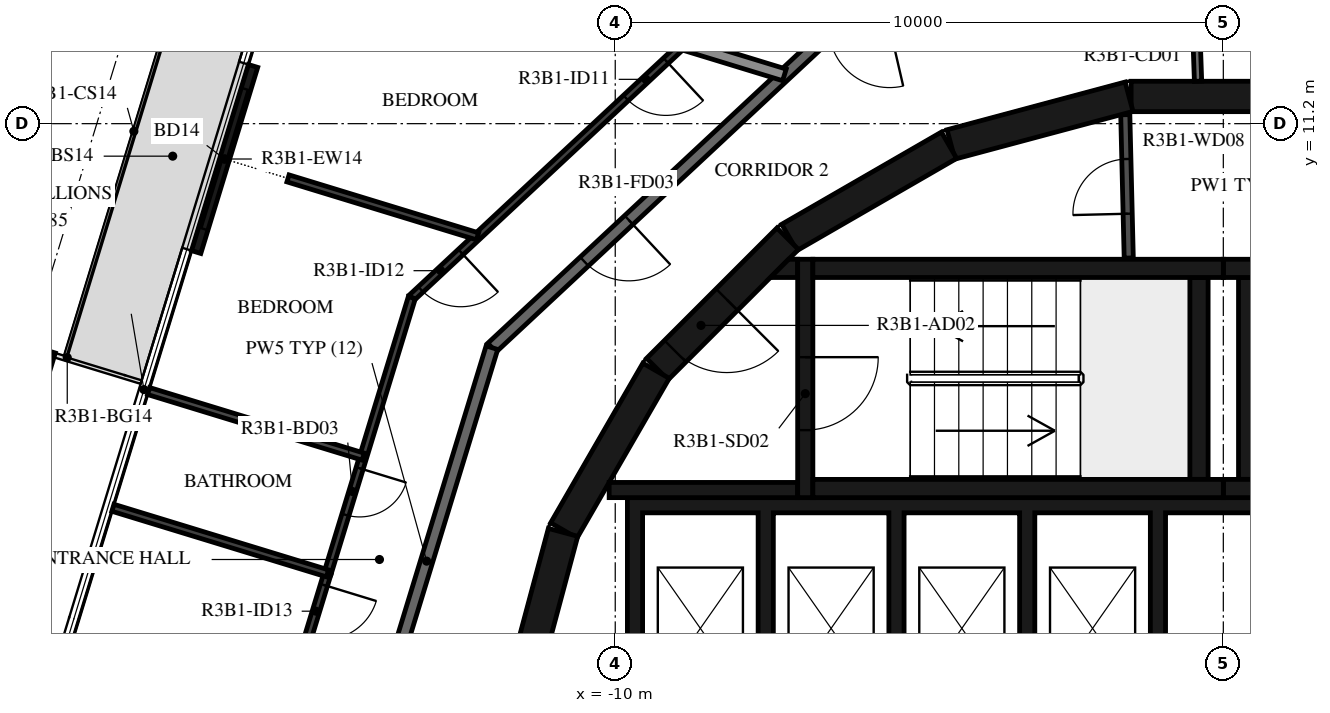
"""IFC4 building model, lengths in metres.
Left out: names, types, materials, properties, quantities, classifications, styles, units other than length and angle.
Written with IfcOpenShell. Run it as: python <this file> out.ifc"""

import sys

from ifc_helpers import new_model, si_unit, direction, frame, frame_2d, origin, origin_2d, place, context, subcontext, project, spatial, polyline, rectangle, i_section, outline, extrude, element, fill, save


model = new_model("IFC4")
c1 = context("Model", 3, precision=1e-05, world=origin(), true_north=direction((0.0, 1.0)))
c2 = subcontext(c1, "Body", "Model", "MODEL_VIEW")
j1 = project(units=[si_unit("LENGTHUNIT", "METRE"), si_unit("PLANEANGLEUNIT", "RADIAN")], contexts=[c1])
p1 = place(None, origin())
s1 = spatial("IfcSite", under=j1, at=p1, CompositionType="ELEMENT")
p2 = place(p1, origin())
s2 = spatial("IfcBuilding", under=s1, at=p2, CompositionType="ELEMENT")
p3 = place(p2, frame((0.0, 0.0, 123.9)))
s3 = spatial("IfcBuildingStorey", under=s2, at=p3, CompositionType="ELEMENT", Elevation=123.9)
p4 = place(p3, frame((-19.682, 7.417, -0.38), z_axis=(0.0, 0.0, 1.0), x_axis=(0.29237190653, 0.956304694264, 0.0)))
e1 = element("IfcColumn", 1, at=p4, inside=s3, PredefinedType="COLUMN", context=c2, shape_type="SweptSolid", body=[
    extrude(i_section(OverallWidth=0.3, OverallDepth=0.9, WebThickness=0.019, FlangeThickness=0.035, FilletRadius=0.03, at=origin_2d()), origin(), (0.0, 0.0, 1.0), 3.5),
])
p5 = place(p3, frame((-15.956, 12.149, 0.0), z_axis=(0.0, 0.0, 1.0), x_axis=(-0.29243949851, -0.956284026695, 0.0)))
e2 = element("IfcWall", 2, at=p5, inside=s3, PredefinedType="STANDARD", context=c2, shape_type="SweptSolid", body=[
    extrude(rectangle(XDim=3.2, YDim=0.16, at=frame_2d((1.6, 0.0))), origin(), (0.0, 0.0, 1.0), 3.12),
])
p6 = place(p5, frame((0.4, 0.0, 0.0)))
e3 = element("IfcOpeningElement", 3, at=p6, cuts=e2, PredefinedType="OPENING", context=c2, shape_type="SweptSolid", body=[
    extrude(rectangle(XDim=2.4, YDim=2.4, at=frame_2d((1.2, 1.2))), frame((0.0, 0.09, 0.0), z_axis=(0.0, -1.0, 0.0), x_axis=(1.0, 0.0, 0.0)), (0.0, 0.0, 1.0), 0.18),
])
for number, where, z_axis, x_axis in (
    (4, (1.516, 11.647, 0.0), (0.0, 0.0, 1.0), (-1.0, 0.0, 0.0)),
    (5, (-1.55, 11.643, 0.0), (0.0, 0.0, 1.0), (-0.966, -0.259, 0.0)),
    (6, (-4.51, 10.845, 0.0), (0.0, 0.0, 1.0), (-0.866, -0.5, 0.0)),
):
    element("IfcWall", number, at=place(p3, frame(where, z_axis=z_axis, x_axis=x_axis)), inside=s3, PredefinedType="SHEAR", context=c2, shape_type="SweptSolid", body=[
        extrude(rectangle(XDim=3.033, YDim=0.5, at=frame_2d((1.516, 0.0))), origin(), (0.0, 0.0, 1.0), 3.12),
    ])
p7 = place(p3, frame((-7.164, 9.308, 0.0), z_axis=(0.0, 0.0, 1.0), x_axis=(-0.707106781187, -0.707106781187, 0.0)))
e7 = element("IfcWall", 7, at=p7, inside=s3, PredefinedType="SHEAR", context=c2, shape_type="SweptSolid", body=[
    extrude(rectangle(XDim=3.032, YDim=0.5, at=frame_2d((1.516, 0.0))), origin(), (0.0, 0.0, 1.0), 3.12),
])
p8 = place(p7, frame((1.416, 0.0, 0.0)))
e8 = element("IfcOpeningElement", 8, at=p8, cuts=e7, PredefinedType="OPENING", context=c2, shape_type="SweptSolid", body=[
    extrude(rectangle(XDim=1.2, YDim=2.1, at=frame_2d((0.6, 1.05))), frame((0.0, 0.26, 0.0), z_axis=(0.0, -1.0, 0.0), x_axis=(1.0, 0.0, 0.0)), (0.0, 0.0, 1.0), 0.52),
])
for number, where, z_axis, x_axis in (
    (9, (-9.329, 7.137, 0.0), (0.0, 0.0, 1.0), (-0.5, -0.866, 0.0)),
    (10, (-10.858, 4.479, 0.0), (0.0, 0.0, 1.0), (-0.259, -0.966, 0.0)),
):
    element("IfcWall", number, at=place(p3, frame(where, z_axis=z_axis, x_axis=x_axis)), inside=s3, PredefinedType="SHEAR", context=c2, shape_type="SweptSolid", body=[
        extrude(rectangle(XDim=3.033, YDim=0.5, at=frame_2d((1.516, 0.0))), origin(), (0.0, 0.0, 1.0), 3.12),
    ])
for number, where, z_axis, x_axis in (
    (11, (0.0, 5.2, 0.0), (0.0, 0.0, 1.0), (1.0, 0.0, 0.0)),
    (12, (0.0, 8.82, 0.0), (0.0, 0.0, 1.0), (1.0, 0.0, 0.0)),
):
    element("IfcWall", number, at=place(p3, frame(where, z_axis=z_axis, x_axis=x_axis)), inside=s3, PredefinedType="SHEAR", context=c2, shape_type="SweptSolid", body=[
        extrude(rectangle(XDim=6.75, YDim=0.3, at=frame_2d((3.375, 0.0))), origin(), (0.0, 0.0, 1.0), 3.12),
    ])
p9 = place(p3, frame((0.4, 5.35, 0.0), z_axis=(0.0, 0.0, 1.0), x_axis=(0.0, 1.0, 0.0)))
e13 = element("IfcWall", 13, at=p9, inside=s3, PredefinedType="SHEAR", context=c2, shape_type="SweptSolid", body=[
    extrude(rectangle(XDim=3.32, YDim=0.3, at=frame_2d((1.66, 0.0))), origin(), (0.0, 0.0, 1.0), 3.12),
])
for number, where, z_axis, x_axis in (
    (14, (-6.75, 5.2, 0.0), (0.0, 0.0, 1.0), (1.0, 0.0, 0.0)),
    (15, (-6.75, 8.82, 0.0), (0.0, 0.0, 1.0), (1.0, 0.0, 0.0)),
):
    element("IfcWall", number, at=place(p3, frame(where, z_axis=z_axis, x_axis=x_axis)), inside=s3, PredefinedType="SHEAR", context=c2, shape_type="SweptSolid", body=[
        extrude(rectangle(XDim=6.75, YDim=0.3, at=frame_2d((3.375, 0.0))), origin(), (0.0, 0.0, 1.0), 3.12),
    ])
p10 = place(p3, frame((-0.4, 5.35, 0.0), z_axis=(0.0, 0.0, 1.0), x_axis=(0.0, 1.0, 0.0)))
e16 = element("IfcWall", 16, at=p10, inside=s3, PredefinedType="SHEAR", context=c2, shape_type="SweptSolid", body=[
    extrude(rectangle(XDim=3.32, YDim=0.3, at=frame_2d((1.66, 0.0))), origin(), (0.0, 0.0, 1.0), 3.12),
])
p11 = place(p3, frame((-6.875, 8.97, 0.0), z_axis=(0.0, 0.0, 1.0), x_axis=(0.0, -1.0, 0.0)))
e17 = element("IfcWall", 17, at=p11, inside=s3, PredefinedType="SHEAR", context=c2, shape_type="SweptSolid", body=[
    extrude(rectangle(XDim=3.92, YDim=0.25, at=frame_2d((1.96, 0.0))), origin(), (0.0, 0.0, 1.0), 3.12),
])
p12 = place(p11, frame((1.61, 0.0, 0.0)))
e18 = element("IfcOpeningElement", 18, at=p12, cuts=e17, PredefinedType="OPENING", context=c2, shape_type="SweptSolid", body=[
    extrude(rectangle(XDim=1.2, YDim=2.1, at=frame_2d((0.6, 1.05))), frame((0.0, 0.135, 0.0), z_axis=(0.0, -1.0, 0.0), x_axis=(1.0, 0.0, 0.0)), (0.0, 0.0, 1.0), 0.27),
])
p13 = place(p3, frame((-7.0, 5.175, 0.0), z_axis=(0.0, 0.0, 1.0), x_axis=(-1.0, 0.0, 0.0)))
e19 = element("IfcWall", 19, at=p13, inside=s3, PredefinedType="SHEAR", context=c2, shape_type="SweptSolid", body=[
    extrude(rectangle(XDim=3.1, YDim=0.25, at=frame_2d((1.55, 0.0))), origin(), (0.0, 0.0, 1.0), 3.12),
])
p14 = place(p3, origin())
e20 = element("IfcWall", 20, at=p14, inside=s3, PredefinedType="SHEAR", context=c2, shape_type="SweptSolid", body=[
    extrude(outline(polyline([(-7.148, 8.97), (-7.0, 8.97), (-7.0, 8.67), (-7.448, 8.67), (-7.148, 8.97)])), origin(), (0.0, 0.0, 1.0), 3.12),
])
p15 = place(p3, origin())
e21 = element("IfcWall", 21, at=p15, inside=s3, PredefinedType="SHEAR", context=c2, shape_type="SweptSolid", body=[
    extrude(outline(polyline([(-9.55, 4.8), (-7.65, 4.8), (-7.65, 1.9), (-7.4, 1.9), (-7.4, 4.8), (-5.5, 4.8), (-5.5, 1.9), (-5.25, 1.9), (-5.25, 4.8), (-3.35, 4.8), (-3.35, 1.9), (-3.1, 1.9), (-3.1, 4.8), (-1.2, 4.8), (-1.2, 1.9), (-0.95, 1.9), (-0.95, 4.8), (3.1, 4.8), (3.1, 1.9), (3.35, 1.9), (3.35, 4.8), (5.25, 4.8), (5.25, 1.9), (5.5, 1.9), (5.5, 4.8), (7.4, 4.8), (7.4, 1.9), (7.65, 1.9), (7.65, 4.8), (9.55, 4.8), (9.55, 1.9), (9.8, 1.9), (9.8, 4.8), (9.8, 5.05), (-9.8, 5.05), (-9.8, 4.8), (-9.8, 1.9), (-9.55, 1.9), (-9.55, 4.8)])), origin(), (0.0, 0.0, 1.0), 3.12),
])
p16 = place(p3, frame((-1.555, 8.99, 0.0), z_axis=(0.0, 0.0, 1.0), x_axis=(-0.024125549686, 0.999708936567, 0.0)))
e22 = element("IfcWall", 22, at=p16, inside=s3, PredefinedType="PARTITIONING", context=c2, shape_type="SweptSolid", body=[
    extrude(rectangle(XDim=2.358, YDim=0.15, at=frame_2d((1.179, 0.0))), origin(), (0.0, 0.0, 1.0), 3.12),
])
p17 = place(p16, frame((0.729, 0.0, 0.0)))
e23 = element("IfcOpeningElement", 23, at=p17, cuts=e22, PredefinedType="OPENING", context=c2, shape_type="SweptSolid", body=[
    extrude(rectangle(XDim=0.9, YDim=2.1, at=frame_2d((0.45, 1.05))), frame((0.0, 0.085, 0.0), z_axis=(0.0, -1.0, 0.0), x_axis=(1.0, 0.0, 0.0)), (0.0, 0.0, 1.0), 0.17),
])
p18 = place(p3, frame((-0.487, 13.948, 0.0), z_axis=(0.0, 0.0, 1.0), x_axis=(0.034859752231, -0.999392214135, 0.0)))
e24 = element("IfcWall", 24, at=p18, inside=s3, PredefinedType="PARTITIONING", context=c2, shape_type="SweptSolid", body=[
    extrude(rectangle(XDim=2.052, YDim=0.12, at=frame_2d((1.026, 0.0))), origin(), (0.0, 0.0, 1.0), 3.12),
])
p19 = place(p18, frame((0.125, 0.0, 0.0)))
e25 = element("IfcOpeningElement", 25, at=p19, cuts=e24, PredefinedType="OPENING", context=c2, shape_type="SweptSolid", body=[
    extrude(rectangle(XDim=1.2, YDim=2.1, at=frame_2d((0.6, 1.05))), frame((0.0, 0.07, 0.0), z_axis=(0.0, -1.0, 0.0), x_axis=(1.0, 0.0, 0.0)), (0.0, 0.0, 1.0), 0.14),
])
p20 = place(p3, frame((-6.659, 12.523, 0.0), z_axis=(0.0, 0.0, 1.0), x_axis=(-0.731350455479, -0.682001841105, 0.0)))
e26 = element("IfcWall", 26, at=p20, inside=s3, PredefinedType="STANDARD", context=c2, shape_type="SweptSolid", body=[
    extrude(rectangle(XDim=7.342, YDim=0.2, at=frame_2d((3.671, 0.0))), origin(), (0.0, 0.0, 1.0), 3.12),
])
p21 = place(p20, frame((4.264, 0.0, 0.0)))
e27 = element("IfcOpeningElement", 27, at=p21, cuts=e26, PredefinedType="OPENING", context=c2, shape_type="SweptSolid", body=[
    extrude(rectangle(XDim=1.0, YDim=2.1, at=frame_2d((0.5, 1.05))), frame((0.0, 0.11, 0.0), z_axis=(0.0, -1.0, 0.0), x_axis=(1.0, 0.0, 0.0)), (0.0, 0.0, 1.0), 0.22),
])
p22 = place(p3, frame((-12.028, 7.516, 0.0), z_axis=(0.0, 0.0, 1.0), x_axis=(-0.292365533182, -0.956306642771, 0.0)))
e28 = element("IfcWall", 28, at=p22, inside=s3, PredefinedType="STANDARD", context=c2, shape_type="SweptSolid", body=[
    extrude(rectangle(XDim=7.342, YDim=0.2, at=frame_2d((3.671, 0.0))), origin(), (0.0, 0.0, 1.0), 3.12),
])
p23 = place(p3, frame((-15.327, 14.481, 0.0), z_axis=(0.0, 0.0, 1.0), x_axis=(0.956303504869, -0.292375796837, 0.0)))
e29 = element("IfcWall", 29, at=p23, inside=s3, PredefinedType="STANDARD", context=c2, shape_type="SweptSolid", body=[
    extrude(rectangle(XDim=8.48, YDim=0.2, at=frame_2d((4.24, 0.0))), origin(), (0.0, 0.0, 1.0), 2.73),
])
p24 = place(p3, frame((-7.388, 13.894, 0.0), z_axis=(0.0, 0.0, 1.0), x_axis=(-0.731357186721, -0.681994622729, 0.0)))
e30 = element("IfcWall", 30, at=p24, inside=s3, PredefinedType="PARTITIONING", context=c2, shape_type="SweptSolid", body=[
    extrude(rectangle(XDim=8.146, YDim=0.12, at=frame_2d((4.073, 0.0))), origin(), (0.0, 0.0, 1.0), 3.12),
])
p25 = place(p24, frame((2.432, 0.0, 0.0)))
e31 = element("IfcOpeningElement", 31, at=p25, cuts=e30, PredefinedType="OPENING", context=c2, shape_type="SweptSolid", body=[
    extrude(rectangle(XDim=0.9, YDim=2.1, at=frame_2d((0.45, 1.05))), frame((0.0, 0.07, 0.0), z_axis=(0.0, -1.0, 0.0), x_axis=(1.0, 0.0, 0.0)), (0.0, 0.0, 1.0), 0.14),
])
p26 = place(p24, frame((7.046, 0.0, 0.0)))
e32 = element("IfcOpeningElement", 32, at=p26, cuts=e30, PredefinedType="OPENING", context=c2, shape_type="SweptSolid", body=[
    extrude(rectangle(XDim=0.9, YDim=2.1, at=frame_2d((0.45, 1.05))), frame((0.0, 0.07, 0.0), z_axis=(0.0, -1.0, 0.0), x_axis=(1.0, 0.0, 0.0)), (0.0, 0.0, 1.0), 0.14),
])
p27 = place(p3, frame((-13.345, 8.339, 0.0), z_axis=(0.0, 0.0, 1.0), x_axis=(-0.292341490839, -0.956313992752, 0.0)))
e33 = element("IfcWall", 33, at=p27, inside=s3, PredefinedType="PARTITIONING", context=c2, shape_type="SweptSolid", body=[
    extrude(rectangle(XDim=4.742, YDim=0.12, at=frame_2d((2.371, 0.0))), origin(), (0.0, 0.0, 1.0), 3.12),
])
p28 = place(p27, frame((2.935, 0.0, 0.0)))
e34 = element("IfcOpeningElement", 34, at=p28, cuts=e33, PredefinedType="OPENING", context=c2, shape_type="SweptSolid", body=[
    extrude(rectangle(XDim=0.8, YDim=2.1, at=frame_2d((0.4, 1.05))), frame((0.0, 0.07, 0.0), z_axis=(0.0, -1.0, 0.0), x_axis=(1.0, 0.0, 0.0)), (0.0, 0.0, 1.0), 0.14),
])
p29 = place(p3, frame((-14.731, 3.804, 0.0), z_axis=(0.0, 0.0, 1.0), x_axis=(-0.292371609919, -0.956304784947, 0.0)))
e35 = element("IfcWall", 35, at=p29, inside=s3, PredefinedType="PARTITIONING", context=c2, shape_type="SweptSolid", body=[
    extrude(rectangle(XDim=3.404, YDim=0.12, at=frame_2d((1.702, 0.0))), origin(), (0.0, 0.0, 1.0), 3.12),
])
p30 = place(p29, frame((0.2, 0.0, 0.0)))
e36 = element("IfcOpeningElement", 36, at=p30, cuts=e35, PredefinedType="OPENING", context=c2, shape_type="SweptSolid", body=[
    extrude(rectangle(XDim=0.9, YDim=2.1, at=frame_2d((0.45, 1.05))), frame((0.0, 0.07, 0.0), z_axis=(0.0, -1.0, 0.0), x_axis=(1.0, 0.0, 0.0)), (0.0, 0.0, 1.0), 0.14),
])
p31 = place(p3, frame((-15.382, 10.3, 0.0), z_axis=(0.0, 0.0, 1.0), x_axis=(0.956302139964, -0.292380261134, 0.0)))
e37 = element("IfcWall", 37, at=p31, inside=s3, PredefinedType="PARTITIONING", context=c2, shape_type="SweptSolid", body=[
    extrude(rectangle(XDim=3.26, YDim=0.12, at=frame_2d((1.63, 0.0))), origin(), (0.0, 0.0, 1.0), 3.12),
])
p32 = place(p3, frame((-17.674, 6.803, 0.0), z_axis=(0.0, 0.0, 1.0), x_axis=(0.956309456779, -0.292356328604, 0.0)))
e38 = element("IfcWall", 38, at=p32, inside=s3, PredefinedType="PARTITIONING", context=c2, shape_type="SweptSolid", body=[
    extrude(rectangle(XDim=3.691, YDim=0.12, at=frame_2d((1.846, 0.0))), origin(), (0.0, 0.0, 1.0), 2.73),
])
p33 = place(p3, frame((-14.731, 3.804, 0.0), z_axis=(0.0, 0.0, 1.0), x_axis=(-0.956303802771, 0.292374822456, 0.0)))
e39 = element("IfcWall", 39, at=p33, inside=s3, PredefinedType="PARTITIONING", context=c2, shape_type="SweptSolid", body=[
    extrude(rectangle(XDim=3.691, YDim=0.12, at=frame_2d((1.845, 0.0))), origin(), (0.0, 0.0, 1.0), 3.12),
])
p34 = place(p6, origin())
e40 = element("IfcDoor", 40, at=p34, inside=s3, OperationType="DOUBLE_DOOR_SLIDING", PredefinedType="DOOR", context=c2, shape_type="SweptSolid", body=[
    extrude(rectangle(XDim=2.4, YDim=2.4, at=frame_2d((1.2, 1.2))), frame((0.0, 0.025, 0.0), z_axis=(0.0, -1.0, 0.0), x_axis=(1.0, 0.0, 0.0)), (0.0, 0.0, 1.0), 0.05),
])
fill(e3, e40)
p35 = place(p12, origin())
e41 = element("IfcDoor", 41, at=p35, inside=s3, OperationType="SINGLE_SWING_LEFT", PredefinedType="DOOR", context=c2, shape_type="SweptSolid", body=[
    extrude(rectangle(XDim=1.2, YDim=2.1, at=frame_2d((0.6, 1.05))), frame((0.0, 0.025, 0.0), z_axis=(0.0, -1.0, 0.0), x_axis=(1.0, 0.0, 0.0)), (0.0, 0.0, 1.0), 0.05),
])
fill(e18, e41)
p36 = place(p8, origin())
e42 = element("IfcDoor", 42, at=p36, inside=s3, OperationType="SINGLE_SWING_RIGHT", PredefinedType="DOOR", context=c2, shape_type="SweptSolid", body=[
    extrude(rectangle(XDim=1.2, YDim=2.1, at=frame_2d((0.6, 1.05))), frame((0.0, 0.025, 0.0), z_axis=(0.0, -1.0, 0.0), x_axis=(1.0, 0.0, 0.0)), (0.0, 0.0, 1.0), 0.05),
])
fill(e8, e42)
p37 = place(p17, origin())
e43 = element("IfcDoor", 43, at=p37, inside=s3, OperationType="SINGLE_SWING_LEFT", PredefinedType="DOOR", context=c2, shape_type="SweptSolid", body=[
    extrude(rectangle(XDim=0.9, YDim=2.1, at=frame_2d((0.45, 1.05))), frame((0.0, 0.025, 0.0), z_axis=(0.0, -1.0, 0.0), x_axis=(1.0, 0.0, 0.0)), (0.0, 0.0, 1.0), 0.05),
])
fill(e23, e43)
p38 = place(p21, origin())
e44 = element("IfcDoor", 44, at=p38, inside=s3, OperationType="SINGLE_SWING_LEFT", PredefinedType="DOOR", context=c2, shape_type="SweptSolid", body=[
    extrude(rectangle(XDim=1.0, YDim=2.1, at=frame_2d((0.5, 1.05))), frame((0.0, 0.025, 0.0), z_axis=(0.0, -1.0, 0.0), x_axis=(1.0, 0.0, 0.0)), (0.0, 0.0, 1.0), 0.05),
])
fill(e27, e44)
p39 = place(p25, origin())
e45 = element("IfcDoor", 45, at=p39, inside=s3, OperationType="SINGLE_SWING_LEFT", PredefinedType="DOOR", context=c2, shape_type="SweptSolid", body=[
    extrude(rectangle(XDim=0.9, YDim=2.1, at=frame_2d((0.45, 1.05))), frame((0.0, 0.025, 0.0), z_axis=(0.0, -1.0, 0.0), x_axis=(1.0, 0.0, 0.0)), (0.0, 0.0, 1.0), 0.05),
])
fill(e31, e45)
p40 = place(p26, origin())
e46 = element("IfcDoor", 46, at=p40, inside=s3, OperationType="SINGLE_SWING_LEFT", PredefinedType="DOOR", context=c2, shape_type="SweptSolid", body=[
    extrude(rectangle(XDim=0.9, YDim=2.1, at=frame_2d((0.45, 1.05))), frame((0.0, 0.025, 0.0), z_axis=(0.0, -1.0, 0.0), x_axis=(1.0, 0.0, 0.0)), (0.0, 0.0, 1.0), 0.05),
])
fill(e32, e46)
p41 = place(p30, origin())
e47 = element("IfcDoor", 47, at=p41, inside=s3, OperationType="SINGLE_SWING_RIGHT", PredefinedType="DOOR", context=c2, shape_type="SweptSolid", body=[
    extrude(rectangle(XDim=0.9, YDim=2.1, at=frame_2d((0.45, 1.05))), frame((0.0, 0.025, 0.0), z_axis=(0.0, -1.0, 0.0), x_axis=(1.0, 0.0, 0.0)), (0.0, 0.0, 1.0), 0.05),
])
fill(e36, e47)
p42 = place(p28, origin())
e48 = element("IfcDoor", 48, at=p42, inside=s3, OperationType="SINGLE_SWING_LEFT", PredefinedType="DOOR", context=c2, shape_type="SweptSolid", body=[
    extrude(rectangle(XDim=0.8, YDim=2.1, at=frame_2d((0.4, 1.05))), frame((0.0, 0.025, 0.0), z_axis=(0.0, -1.0, 0.0), x_axis=(1.0, 0.0, 0.0)), (0.0, 0.0, 1.0), 0.05),
])
fill(e34, e48)
save(model, sys.argv[1])
